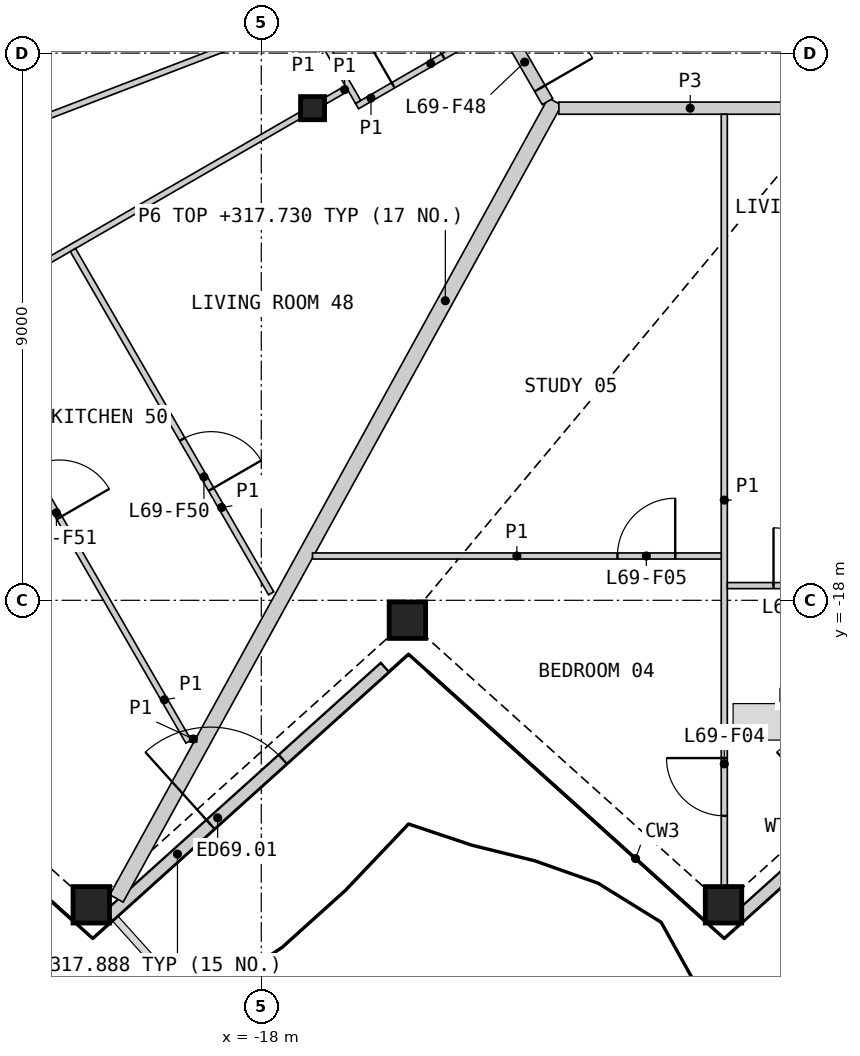
"""IFC4 building model, lengths in metres.
Left out: names, types, materials, properties, quantities, classifications, styles, units other than length and angle.
Written with IfcOpenShell. Run it as: python <this file> out.ifc"""

import sys

from ifc_helpers import new_model, si_unit, direction, frame, frame_2d, origin, origin_2d, place, context, subcontext, project, spatial, rectangle, hollow_rectangle, i_section, extrude, element, fill, save


model = new_model("IFC4")
c1 = context("Model", 3, precision=1e-05, world=origin(), true_north=direction((0.0, 1.0)))
c2 = subcontext(c1, "Body", "Model", "MODEL_VIEW")
j1 = project(units=[si_unit("LENGTHUNIT", "METRE"), si_unit("PLANEANGLEUNIT", "RADIAN")], contexts=[c1])
p1 = place(None, origin())
s1 = spatial("IfcSite", under=j1, at=p1, CompositionType="ELEMENT")
p2 = place(p1, origin())
s2 = spatial("IfcBuilding", under=s1, at=p2, CompositionType="ELEMENT")
p3 = place(p2, frame((0.0, 0.0, 315.4)))
s3 = spatial("IfcBuildingStorey", under=s2, at=p3, CompositionType="ELEMENT", Elevation=315.4)
for number, where, z_axis, x_axis in (
    (1, (-20.796, -23.008, 0.0), (0.0, 0.0, 1.0), (1.0, 0.0, 0.0)),
    (2, (-15.597, -18.327, 0.0), (0.0, 0.0, 1.0), (1.0, 0.0, 0.0)),
    (3, (-10.398, -23.008, 0.0), (0.0, 0.0, 1.0), (1.0, 0.0, 0.0)),
):
    element("IfcColumn", number, at=place(p3, frame(where, z_axis=z_axis, x_axis=x_axis)), inside=s3, PredefinedType="COLUMN", context=c2, shape_type="SweptSolid", body=[
        extrude(hollow_rectangle(XDim=0.6, YDim=0.6, WallThickness=0.04, at=origin_2d()), origin(), (0.0, 0.0, 1.0), 3.4),
    ])
p4 = place(p3, frame((-17.157, -9.906, 0.0), z_axis=(0.0, 0.0, 1.0), x_axis=(1.0, 0.0, 0.0)))
e4 = element("IfcColumn", 4, at=p4, inside=s3, PredefinedType="COLUMN", context=c2, shape_type="SweptSolid", body=[
    extrude(i_section(OverallWidth=0.396, OverallDepth=0.381, WebThickness=0.019, FlangeThickness=0.03, at=origin_2d()), origin(), (0.0, 0.0, 1.0), 3.4),
])
p5 = place(p3, frame((-20.516, -23.198, 0.0), z_axis=(0.0, 0.0, 1.0), x_axis=(0.743121537674, 0.66915646918, 0.0)))
e5 = element("IfcWall", 5, at=p5, inside=s3, PredefinedType="SOLIDWALL", context=c2, shape_type="SweptSolid", body=[
    extrude(rectangle(XDim=6.12, YDim=0.2, at=frame_2d((3.06, 0.0))), origin(), (0.0, 0.0, 1.0), 2.488),
])
p6 = place(p5, frame((2.26, 0.0, 0.0)))
e6 = element("IfcOpeningElement", 6, at=p6, cuts=e5, PredefinedType="OPENING", context=c2, shape_type="SweptSolid", body=[
    extrude(rectangle(XDim=1.6, YDim=2.25, at=frame_2d((0.8, 1.125))), frame((0.0, 0.11, 0.0), z_axis=(0.0, -1.0, 0.0), x_axis=(1.0, 0.0, 0.0)), (0.0, 0.0, 1.0), 0.22),
])
p7 = place(p3, frame((-10.13, -23.198, 0.0), z_axis=(0.0, 0.0, 1.0), x_axis=(0.743139400616, 0.669136631229, 0.0)))
e7 = element("IfcWall", 7, at=p7, inside=s3, PredefinedType="SOLIDWALL", context=c2, shape_type="SweptSolid", body=[
    extrude(rectangle(XDim=6.12, YDim=0.2, at=frame_2d((3.06, 0.0))), origin(), (0.0, 0.0, 1.0), 2.488),
])
p8 = place(p7, frame((2.26, 0.0, 0.0)))
e8 = element("IfcOpeningElement", 8, at=p8, cuts=e7, PredefinedType="OPENING", context=c2, shape_type="SweptSolid", body=[
    extrude(rectangle(XDim=1.6, YDim=2.25, at=frame_2d((0.8, 1.125))), frame((0.0, 0.11, 0.0), z_axis=(0.0, -1.0, 0.0), x_axis=(1.0, 0.0, 0.0)), (0.0, 0.0, 1.0), 0.22),
])
p9 = place(p3, frame((-20.381, -22.904, 0.0), z_axis=(0.0, 0.0, 1.0), x_axis=(0.481994550341, 0.876174214093, 0.0)))
e9 = element("IfcWall", 9, at=p9, inside=s3, PredefinedType="PARTITIONING", context=c2, shape_type="SweptSolid", body=[
    extrude(rectangle(XDim=14.96, YDim=0.25, at=frame_2d((7.48, 0.0))), origin(), (0.0, 0.0, 1.0), 2.33),
])
p10 = place(p3, frame((-13.106, -9.906, 0.0), z_axis=(0.0, 0.0, 1.0), x_axis=(1.0, 0.0, 0.0)))
e10 = element("IfcWall", 10, at=p10, inside=s3, PredefinedType="PARTITIONING", context=c2, shape_type="SweptSolid", body=[
    extrude(rectangle(XDim=4.32, YDim=0.2, at=frame_2d((2.16, 0.0))), origin(), (0.0, 0.0, 1.0), 3.1),
])
p11 = place(p3, frame((-15.131, -6.614, 0.0), z_axis=(0.0, 0.0, 1.0), x_axis=(0.499967746641, -0.866044024469, 0.0)))
e11 = element("IfcWall", 11, at=p11, inside=s3, PredefinedType="PARTITIONING", context=c2, shape_type="SweptSolid", body=[
    extrude(rectangle(XDim=3.676, YDim=0.2, at=frame_2d((1.838, 0.0))), origin(), (0.0, 0.0, 1.0), 3.1),
])
p12 = place(p11, frame((2.426, 0.0, 0.0)))
e12 = element("IfcOpeningElement", 12, at=p12, cuts=e11, PredefinedType="OPENING", context=c2, shape_type="SweptSolid", body=[
    extrude(rectangle(XDim=1.0, YDim=2.1, at=frame_2d((0.5, 1.05))), frame((0.0, 0.11, 0.0), z_axis=(0.0, -1.0, 0.0), x_axis=(1.0, 0.0, 0.0)), (0.0, 0.0, 1.0), 0.22),
])
p13 = place(p3, frame((-29.338, -13.042, 0.0), z_axis=(0.0, 0.0, 1.0), x_axis=(0.93358243931, 0.358362705944, 0.0)))
e13 = element("IfcWall", 13, at=p13, inside=s3, PredefinedType="PARTITIONING", context=c2, shape_type="SweptSolid", body=[
    extrude(rectangle(XDim=12.928, YDim=0.1, at=frame_2d((6.464, 0.0))), origin(), (0.0, 0.0, 1.0), 2.33),
])
p14 = place(p13, frame((5.183, 0.0, 0.0)))
e14 = element("IfcOpeningElement", 14, at=p14, cuts=e13, PredefinedType="OPENING", context=c2, shape_type="SweptSolid", body=[
    extrude(rectangle(XDim=0.95, YDim=2.1, at=frame_2d((0.475, 1.05))), frame((0.0, 0.06, 0.0), z_axis=(0.0, -1.0, 0.0), x_axis=(1.0, 0.0, 0.0)), (0.0, 0.0, 1.0), 0.12),
])
p15 = place(p3, frame((-10.385, -22.698, 0.0), z_axis=(0.0, 0.0, 1.0), x_axis=(0.0, 1.0, 0.0)))
e15 = element("IfcWall", 15, at=p15, inside=s3, PredefinedType="PARTITIONING", context=c2, shape_type="SweptSolid", body=[
    extrude(rectangle(XDim=12.692, YDim=0.1, at=frame_2d((6.346, 0.0))), origin(), (0.0, 0.0, 1.0), 2.33),
])
p16 = place(p15, frame((1.153, 0.0, 0.0)))
e16 = element("IfcOpeningElement", 16, at=p16, cuts=e15, PredefinedType="OPENING", context=c2, shape_type="SweptSolid", body=[
    extrude(rectangle(XDim=0.95, YDim=2.1, at=frame_2d((0.475, 1.05))), frame((0.0, 0.06, 0.0), z_axis=(0.0, -1.0, 0.0), x_axis=(1.0, 0.0, 0.0)), (0.0, 0.0, 1.0), 0.12),
])
p17 = place(p3, frame((-27.122, -15.659, 0.0), z_axis=(0.0, 0.0, 1.0), x_axis=(0.866021046153, 0.500007547564, 0.0)))
e17 = element("IfcWall", 17, at=p17, inside=s3, PredefinedType="PARTITIONING", context=c2, shape_type="SweptSolid", body=[
    extrude(rectangle(XDim=11.267, YDim=0.1, at=frame_2d((5.634, 0.0))), origin(), (0.0, 0.0, 1.0), 2.33),
])
p18 = place(p17, frame((1.452, 0.0, 0.0)))
e18 = element("IfcOpeningElement", 18, at=p18, cuts=e17, PredefinedType="OPENING", context=c2, shape_type="SweptSolid", body=[
    extrude(rectangle(XDim=0.95, YDim=2.1, at=frame_2d((0.475, 1.05))), frame((0.0, 0.06, 0.0), z_axis=(0.0, -1.0, 0.0), x_axis=(1.0, 0.0, 0.0)), (0.0, 0.0, 1.0), 0.12),
])
p19 = place(p3, frame((-23.173, -13.437, 0.0), z_axis=(0.0, 0.0, 1.0), x_axis=(0.500018284498, -0.866014846967, 0.0)))
e19 = element("IfcWall", 19, at=p19, inside=s3, PredefinedType="PARTITIONING", context=c2, shape_type="SweptSolid", body=[
    extrude(rectangle(XDim=7.953, YDim=0.1, at=frame_2d((3.977, 0.0))), origin(), (0.0, 0.0, 1.0), 2.33),
])
p20 = place(p19, frame((2.751, 0.0, 0.0)))
e20 = element("IfcOpeningElement", 20, at=p20, cuts=e19, PredefinedType="OPENING", context=c2, shape_type="SweptSolid", body=[
    extrude(rectangle(XDim=0.95, YDim=2.1, at=frame_2d((0.475, 1.05))), frame((0.0, 0.06, 0.0), z_axis=(0.0, -1.0, 0.0), x_axis=(1.0, 0.0, 0.0)), (0.0, 0.0, 1.0), 0.12),
])
p21 = place(p3, frame((-17.158, -17.271, 0.0), z_axis=(0.0, 0.0, 1.0), x_axis=(1.0, 0.0, 0.0)))
e21 = element("IfcWall", 21, at=p21, inside=s3, PredefinedType="PARTITIONING", context=c2, shape_type="SweptSolid", body=[
    extrude(rectangle(XDim=6.722, YDim=0.1, at=frame_2d((3.361, 0.0))), origin(), (0.0, 0.0, 1.0), 2.33),
])
p22 = place(p21, frame((5.015, 0.0, 0.0)))
e22 = element("IfcOpeningElement", 22, at=p22, cuts=e21, PredefinedType="OPENING", context=c2, shape_type="SweptSolid", body=[
    extrude(rectangle(XDim=0.95, YDim=2.1, at=frame_2d((0.475, 1.05))), frame((0.0, 0.06, 0.0), z_axis=(0.0, -1.0, 0.0), x_axis=(1.0, 0.0, 0.0)), (0.0, 0.0, 1.0), 0.12),
])
p23 = place(p3, frame((-21.098, -12.239, 0.0), z_axis=(0.0, 0.0, 1.0), x_axis=(0.499973122483, -0.86604092097, 0.0)))
e23 = element("IfcWall", 23, at=p23, inside=s3, PredefinedType="PARTITIONING", context=c2, shape_type="SweptSolid", body=[
    extrude(rectangle(XDim=6.52, YDim=0.1, at=frame_2d((3.26, 0.0))), origin(), (0.0, 0.0, 1.0), 2.33),
])
p24 = place(p23, frame((3.596, 0.0, 0.0)))
e24 = element("IfcOpeningElement", 24, at=p24, cuts=e23, PredefinedType="OPENING", context=c2, shape_type="SweptSolid", body=[
    extrude(rectangle(XDim=0.95, YDim=2.1, at=frame_2d((0.475, 1.05))), frame((0.0, 0.06, 0.0), z_axis=(0.0, -1.0, 0.0), x_axis=(1.0, 0.0, 0.0)), (0.0, 0.0, 1.0), 0.12),
])
p25 = place(p3, frame((-10.336, -17.758, 0.0), z_axis=(0.0, 0.0, 1.0), x_axis=(1.0, 0.0, 0.0)))
e25 = element("IfcWall", 25, at=p25, inside=s3, PredefinedType="PARTITIONING", context=c2, shape_type="SweptSolid", body=[
    extrude(rectangle(XDim=5.018, YDim=0.1, at=frame_2d((2.509, 0.0))), origin(), (0.0, 0.0, 1.0), 2.33),
])
p26 = place(p25, frame((0.76, 0.0, 0.0)))
e26 = element("IfcOpeningElement", 26, at=p26, cuts=e25, PredefinedType="OPENING", context=c2, shape_type="SweptSolid", body=[
    extrude(rectangle(XDim=0.95, YDim=2.1, at=frame_2d((0.475, 1.05))), frame((0.0, 0.06, 0.0), z_axis=(0.0, -1.0, 0.0), x_axis=(1.0, 0.0, 0.0)), (0.0, 0.0, 1.0), 0.12),
])
p27 = place(p3, frame((-16.426, -9.872, 0.0), z_axis=(0.0, 0.0, 1.0), x_axis=(0.866029095148, 0.499993606316, 0.0)))
e27 = element("IfcWall", 27, at=p27, inside=s3, PredefinedType="PARTITIONING", context=c2, shape_type="SweptSolid", body=[
    extrude(rectangle(XDim=2.65, YDim=0.1, at=frame_2d((1.325, 0.0))), origin(), (0.0, 0.0, 1.0), 2.33),
])
p28 = place(p27, frame((0.686, 0.0, 0.0)))
e28 = element("IfcOpeningElement", 28, at=p28, cuts=e27, PredefinedType="OPENING", context=c2, shape_type="SweptSolid", body=[
    extrude(rectangle(XDim=0.95, YDim=2.1, at=frame_2d((0.475, 1.05))), frame((0.0, 0.06, 0.0), z_axis=(0.0, -1.0, 0.0), x_axis=(1.0, 0.0, 0.0)), (0.0, 0.0, 1.0), 0.12),
])
p29 = place(p3, frame((-17.507, -7.899, 0.0), z_axis=(0.0, 0.0, 1.0), x_axis=(0.499946605688, -0.86605622881, 0.0)))
e29 = element("IfcWall", 29, at=p29, inside=s3, PredefinedType="PARTITIONING", context=c2, shape_type="SweptSolid", body=[
    extrude(rectangle(XDim=2.2, YDim=0.1, at=frame_2d((1.1, 0.0))), origin(), (0.0, 0.0, 1.0), 2.33),
])
p30 = place(p3, frame((-16.949, -9.786, 0.0), z_axis=(0.0, 0.0, 1.0), x_axis=(0.866036909293, 0.499980071345, 0.0)))
e30 = element("IfcWall", 30, at=p30, inside=s3, PredefinedType="PARTITIONING", context=c2, shape_type="SweptSolid", body=[
    extrude(rectangle(XDim=0.41, YDim=0.1, at=frame_2d((0.205, 0.0))), origin(), (0.0, 0.0, 1.0), 2.33),
])
p31 = place(p3, frame((-19.171, -20.281, 0.0), z_axis=(0.0, 0.0, 1.0), x_axis=(1.0, 0.0, 0.0)))
e31 = element("IfcWall", 31, at=p31, inside=s3, PredefinedType="PARTITIONING", context=c2, shape_type="SweptSolid", body=[
    extrude(rectangle(XDim=0.108, YDim=0.1, at=frame_2d((0.054, 0.0))), origin(), (0.0, 0.0, 1.0), 2.33),
])
p32 = place(p6, origin())
e32 = element("IfcDoor", 32, at=p32, inside=s3, OperationType="DOUBLE_DOOR_SINGLE_SWING", PredefinedType="DOOR", context=c2, shape_type="SweptSolid", body=[
    extrude(rectangle(XDim=1.6, YDim=2.25, at=frame_2d((0.8, 1.125))), frame((0.0, 0.025, 0.0), z_axis=(0.0, -1.0, 0.0), x_axis=(1.0, 0.0, 0.0)), (0.0, 0.0, 1.0), 0.05),
])
fill(e6, e32)
p33 = place(p26, origin())
e33 = element("IfcDoor", 33, at=p33, inside=s3, OperationType="SINGLE_SWING_LEFT", PredefinedType="DOOR", context=c2, shape_type="SweptSolid", body=[
    extrude(rectangle(XDim=0.95, YDim=2.1, at=frame_2d((0.475, 1.05))), frame((0.0, 0.025, 0.0), z_axis=(0.0, -1.0, 0.0), x_axis=(1.0, 0.0, 0.0)), (0.0, 0.0, 1.0), 0.05),
])
fill(e26, e33)
p34 = place(p16, origin())
e34 = element("IfcDoor", 34, at=p34, inside=s3, OperationType="SINGLE_SWING_RIGHT", PredefinedType="DOOR", context=c2, shape_type="SweptSolid", body=[
    extrude(rectangle(XDim=0.95, YDim=2.1, at=frame_2d((0.475, 1.05))), frame((0.0, 0.025, 0.0), z_axis=(0.0, -1.0, 0.0), x_axis=(1.0, 0.0, 0.0)), (0.0, 0.0, 1.0), 0.05),
])
fill(e16, e34)
p35 = place(p22, origin())
e35 = element("IfcDoor", 35, at=p35, inside=s3, OperationType="SINGLE_SWING_RIGHT", PredefinedType="DOOR", context=c2, shape_type="SweptSolid", body=[
    extrude(rectangle(XDim=0.95, YDim=2.1, at=frame_2d((0.475, 1.05))), frame((0.0, 0.025, 0.0), z_axis=(0.0, -1.0, 0.0), x_axis=(1.0, 0.0, 0.0)), (0.0, 0.0, 1.0), 0.05),
])
fill(e22, e35)
p36 = place(p12, origin())
e36 = element("IfcDoor", 36, at=p36, inside=s3, OperationType="SINGLE_SWING_RIGHT", PredefinedType="DOOR", context=c2, shape_type="SweptSolid", body=[
    extrude(rectangle(XDim=1.0, YDim=2.1, at=frame_2d((0.5, 1.05))), frame((0.0, 0.025, 0.0), z_axis=(0.0, -1.0, 0.0), x_axis=(1.0, 0.0, 0.0)), (0.0, 0.0, 1.0), 0.05),
])
fill(e12, e36)
p37 = place(p28, origin())
e37 = element("IfcDoor", 37, at=p37, inside=s3, OperationType="SINGLE_SWING_LEFT", PredefinedType="DOOR", context=c2, shape_type="SweptSolid", body=[
    extrude(rectangle(XDim=0.95, YDim=2.1, at=frame_2d((0.475, 1.05))), frame((0.0, 0.025, 0.0), z_axis=(0.0, -1.0, 0.0), x_axis=(1.0, 0.0, 0.0)), (0.0, 0.0, 1.0), 0.05),
])
fill(e28, e37)
p38 = place(p24, origin())
e38 = element("IfcDoor", 38, at=p38, inside=s3, OperationType="SINGLE_SWING_RIGHT", PredefinedType="DOOR", context=c2, shape_type="SweptSolid", body=[
    extrude(rectangle(XDim=0.95, YDim=2.1, at=frame_2d((0.475, 1.05))), frame((0.0, 0.025, 0.0), z_axis=(0.0, -1.0, 0.0), x_axis=(1.0, 0.0, 0.0)), (0.0, 0.0, 1.0), 0.05),
])
fill(e24, e38)
p39 = place(p20, origin())
e39 = element("IfcDoor", 39, at=p39, inside=s3, OperationType="SINGLE_SWING_RIGHT", PredefinedType="DOOR", context=c2, shape_type="SweptSolid", body=[
    extrude(rectangle(XDim=0.95, YDim=2.1, at=frame_2d((0.475, 1.05))), frame((0.0, 0.025, 0.0), z_axis=(0.0, -1.0, 0.0), x_axis=(1.0, 0.0, 0.0)), (0.0, 0.0, 1.0), 0.05),
])
fill(e20, e39)
save(model, sys.argv[1])
